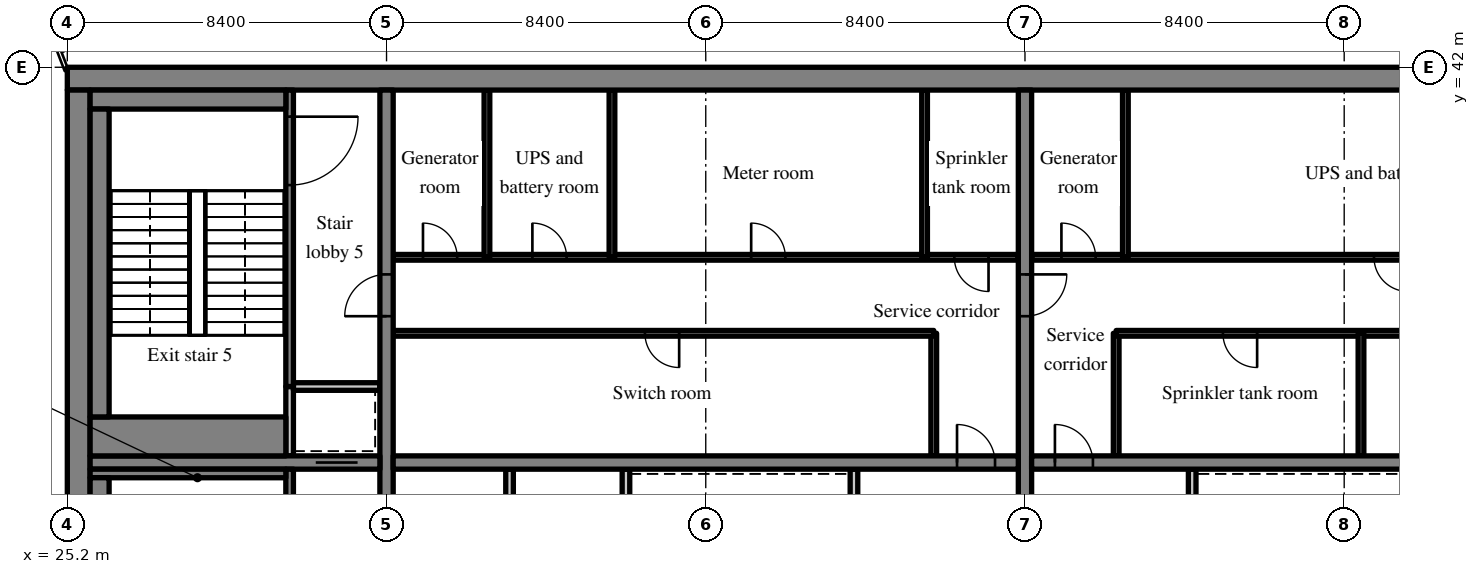
"""IFC4 building model, lengths in metres.
Left out: names, types, materials, properties, quantities, classifications, styles, units other than length and angle.
Written with IfcOpenShell. Run it as: python <this file> out.ifc"""

import sys

from ifc_helpers import new_model, si_unit, direction, frame, frame_2d, origin, place, context, subcontext, project, spatial, rectangle, extrude, source, transform, mapped, element, fill, save


model = new_model("IFC4")
c1 = context("Model", 3, precision=1e-05, world=origin(), true_north=direction((0.0, 1.0)))
c2 = subcontext(c1, "Body", "Model", "MODEL_VIEW")
j1 = project(units=[si_unit("LENGTHUNIT", "METRE"), si_unit("PLANEANGLEUNIT", "RADIAN")], contexts=[c1])
p1 = place(None, origin())
s1 = spatial("IfcSite", under=j1, at=p1, CompositionType="ELEMENT")
p2 = place(p1, origin())
s2 = spatial("IfcBuilding", under=s1, at=p2, CompositionType="ELEMENT")
p3 = place(p2, frame((0.0, 0.0, 206.4)))
s3 = spatial("IfcBuildingStorey", under=s2, at=p3, CompositionType="ELEMENT", Elevation=206.4)
m1 = source(origin(), c2, "Body", "SweptSolid", [
    extrude(rectangle(XDim=50.4, YDim=0.6, at=frame_2d((25.2, 0.0))), origin(), (0.0, 0.0, 1.0), 7.32),
])
p4 = place(p3, frame((25.2, 41.7, 0.0), z_axis=(0.0, 0.0, 1.0), x_axis=(1.0, 0.0, 0.0)))
e1 = element("IfcWall", 1, at=p4, inside=s3, PredefinedType="SHEAR", context=c2, shape_type="MappedRepresentation", body=[
    mapped(m1, transform((0.0, 0.0, 0.0), scale=1.0)),
])
m2 = source(origin(), c2, "Body", "SweptSolid", [
    extrude(rectangle(XDim=18.8, YDim=0.6, at=frame_2d((9.4, 0.0))), origin(), (0.0, 0.0, 1.0), 7.32),
])
p5 = place(p3, frame((25.5, 22.6, 0.0), z_axis=(0.0, 0.0, 1.0), x_axis=(0.0, 1.0, 0.0)))
e2 = element("IfcWall", 2, at=p5, inside=s3, PredefinedType="SHEAR", context=c2, shape_type="MappedRepresentation", body=[
    mapped(m2, transform((0.0, 0.0, 0.0), scale=1.0)),
])
m3 = source(origin(), c2, "Body", "SweptSolid", [
    extrude(rectangle(XDim=18.8, YDim=0.35, at=frame_2d((9.4, 0.0))), origin(), (0.0, 0.0, 1.0), 7.32),
])
p6 = place(p3, frame((33.6, 22.6, 0.0), z_axis=(0.0, 0.0, 1.0), x_axis=(0.0, 1.0, 0.0)))
e3 = element("IfcWall", 3, at=p6, inside=s3, PredefinedType="SHEAR", context=c2, shape_type="MappedRepresentation", body=[
    mapped(m3, transform((0.0, 0.0, 0.0), scale=1.0)),
])
m4 = source(origin(), c2, "Body", "SweptSolid", [
    extrude(rectangle(XDim=1.1, YDim=2.1, at=frame_2d((0.55, 1.05))), frame((0.0, 0.185, 0.0), z_axis=(0.0, -1.0, 0.0), x_axis=(1.0, 0.0, 0.0)), (0.0, 0.0, 1.0), 0.37),
])
p7 = place(p6, frame((12.85, 0.0, 0.0)))
e4 = element("IfcOpeningElement", 4, at=p7, cuts=e3, PredefinedType="OPENING", context=c2, shape_type="MappedRepresentation", body=[
    mapped(m4, transform((0.0, 0.0, 0.0), scale=1.0)),
])
p8 = place(p3, frame((50.4, 22.6, 0.0), z_axis=(0.0, 0.0, 1.0), x_axis=(0.0, 1.0, 0.0)))
e5 = element("IfcWall", 5, at=p8, inside=s3, PredefinedType="SHEAR", context=c2, shape_type="MappedRepresentation", body=[
    mapped(m3, transform((0.0, 0.0, 0.0), scale=1.0)),
])
p9 = place(p8, frame((12.85, 0.0, 0.0)))
e6 = element("IfcOpeningElement", 6, at=p9, cuts=e5, PredefinedType="OPENING", context=c2, shape_type="MappedRepresentation", body=[
    mapped(m4, transform((0.0, 0.0, 0.0), scale=1.0)),
])
m5 = source(origin(), c2, "Body", "SweptSolid", [
    extrude(rectangle(XDim=7.625, YDim=0.35, at=frame_2d((3.812, 0.0))), origin(), (0.0, 0.0, 1.0), 7.32),
])
p10 = place(p3, frame((25.8, 31.6, 0.0), z_axis=(0.0, 0.0, 1.0), x_axis=(1.0, 0.0, 0.0)))
e7 = element("IfcWall", 7, at=p10, inside=s3, PredefinedType="SHEAR", context=c2, shape_type="MappedRepresentation", body=[
    mapped(m5, transform((0.0, 0.0, 0.0), scale=1.0)),
])
p11 = place(p10, frame((5.938, 0.0, 0.0)))
e8 = element("IfcOpeningElement", 8, at=p11, cuts=e7, PredefinedType="OPENING", context=c2, shape_type="MappedRepresentation", body=[
    mapped(m4, transform((0.0, 0.0, 0.0), scale=1.0)),
])
m6 = source(origin(), c2, "Body", "SweptSolid", [
    extrude(rectangle(XDim=16.45, YDim=0.35, at=frame_2d((8.225, 0.0))), origin(), (0.0, 0.0, 1.0), 7.32),
])
p12 = place(p3, frame((33.775, 31.6, 0.0), z_axis=(0.0, 0.0, 1.0), x_axis=(1.0, 0.0, 0.0)))
e9 = element("IfcWall", 9, at=p12, inside=s3, PredefinedType="SHEAR", context=c2, shape_type="MappedRepresentation", body=[
    mapped(m6, transform((0.0, 0.0, 0.0), scale=1.0)),
])
m7 = source(origin(), c2, "Body", "SweptSolid", [
    extrude(rectangle(XDim=1.0, YDim=2.1, at=frame_2d((0.5, 1.05))), frame((0.0, 0.185, 0.0), z_axis=(0.0, -1.0, 0.0), x_axis=(1.0, 0.0, 0.0)), (0.0, 0.0, 1.0), 0.37),
])
p13 = place(p12, frame((14.837, 0.0, 0.0)))
e10 = element("IfcOpeningElement", 10, at=p13, cuts=e9, PredefinedType="OPENING", context=c2, shape_type="MappedRepresentation", body=[
    mapped(m7, transform((0.0, 0.0, 0.0), scale=1.0)),
])
m8 = source(origin(), c2, "Body", "SweptSolid", [
    extrude(rectangle(XDim=16.45, YDim=0.35, at=frame_2d((8.225, 0.0))), origin(), (0.0, 0.0, 1.0), 7.32),
])
p14 = place(p3, frame((50.575, 31.6, 0.0), z_axis=(0.0, 0.0, 1.0), x_axis=(1.0, 0.0, 0.0)))
e11 = element("IfcWall", 11, at=p14, inside=s3, PredefinedType="SHEAR", context=c2, shape_type="MappedRepresentation", body=[
    mapped(m8, transform((0.0, 0.0, 0.0), scale=1.0)),
])
p15 = place(p14, frame((0.613, 0.0, 0.0)))
e12 = element("IfcOpeningElement", 12, at=p15, cuts=e11, PredefinedType="OPENING", context=c2, shape_type="MappedRepresentation", body=[
    mapped(m7, transform((0.0, 0.0, 0.0), scale=1.0)),
])
m9 = source(origin(), c2, "Body", "SweptSolid", [
    extrude(rectangle(XDim=8.825, YDim=0.2, at=frame_2d((4.413, 0.0))), origin(), (0.0, 0.0, 1.0), 7.32),
])
for number, where, z_axis, x_axis in (
    (13, (45.9, 22.6, 0.0), (0.0, 0.0, 1.0), (0.0, 1.0, 0.0)),
    (14, (39.9, 22.6, 0.0), (0.0, 0.0, 1.0), (0.0, 1.0, 0.0)),
    (15, (36.837, 22.6, 0.0), (0.0, 0.0, 1.0), (0.0, 1.0, 0.0)),
):
    element("IfcWall", number, at=place(p3, frame(where, z_axis=z_axis, x_axis=x_axis)), inside=s3, PredefinedType="PARTITIONING", context=c2, shape_type="MappedRepresentation", body=[
        mapped(m9, transform((0.0, 0.0, 0.0), scale=1.0)),
    ])
m10 = source(origin(), c2, "Body", "SweptSolid", [
    extrude(rectangle(XDim=3.225, YDim=0.15, at=frame_2d((1.613, 0.0))), origin(), (0.0, 0.0, 1.0), 7.32),
])
p16 = place(p3, frame((48.0, 31.775, 0.0), z_axis=(0.0, 0.0, 1.0), x_axis=(0.0, 1.0, 0.0)))
e16 = element("IfcWall", 16, at=p16, inside=s3, PredefinedType="PARTITIONING", context=c2, shape_type="MappedRepresentation", body=[
    mapped(m10, transform((0.0, 0.0, 0.0), scale=1.0)),
])
m11 = source(origin(), c2, "Body", "SweptSolid", [
    extrude(rectangle(XDim=14.225, YDim=0.15, at=frame_2d((7.113, 0.0))), origin(), (0.0, 0.0, 1.0), 7.32),
])
p17 = place(p3, frame((33.775, 35.0, 0.0), z_axis=(0.0, 0.0, 1.0), x_axis=(1.0, 0.0, 0.0)))
e17 = element("IfcWall", 17, at=p17, inside=s3, PredefinedType="PARTITIONING", context=c2, shape_type="MappedRepresentation", body=[
    mapped(m11, transform((0.0, 0.0, 0.0), scale=1.0)),
])
m12 = source(origin(), c2, "Body", "SweptSolid", [
    extrude(rectangle(XDim=0.9, YDim=2.1, at=frame_2d((0.45, 1.05))), frame((0.0, 0.085, 0.0), z_axis=(0.0, -1.0, 0.0), x_axis=(1.0, 0.0, 0.0)), (0.0, 0.0, 1.0), 0.17),
])
p18 = place(p17, frame((6.625, 0.0, 0.0)))
e18 = element("IfcOpeningElement", 18, at=p18, cuts=e17, PredefinedType="OPENING", context=c2, shape_type="MappedRepresentation", body=[
    mapped(m12, transform((0.0, 0.0, 0.0), scale=1.0)),
])
m13 = source(origin(), c2, "Body", "SweptSolid", [
    extrude(rectangle(XDim=16.45, YDim=0.15, at=frame_2d((8.225, 0.0))), origin(), (0.0, 0.0, 1.0), 7.32),
])
p19 = place(p3, frame((33.775, 37.0, 0.0), z_axis=(0.0, 0.0, 1.0), x_axis=(1.0, 0.0, 0.0)))
e19 = element("IfcWall", 19, at=p19, inside=s3, PredefinedType="PARTITIONING", context=c2, shape_type="MappedRepresentation", body=[
    mapped(m13, transform((0.0, 0.0, 0.0), scale=1.0)),
])
p20 = place(p19, frame((0.784, 0.0, 0.0)))
e20 = element("IfcOpeningElement", 20, at=p20, cuts=e19, PredefinedType="OPENING", context=c2, shape_type="MappedRepresentation", body=[
    mapped(m12, transform((0.0, 0.0, 0.0), scale=1.0)),
])
p21 = place(p19, frame((3.663, 0.0, 0.0)))
e21 = element("IfcOpeningElement", 21, at=p21, cuts=e19, PredefinedType="OPENING", context=c2, shape_type="MappedRepresentation", body=[
    mapped(m12, transform((0.0, 0.0, 0.0), scale=1.0)),
])
p22 = place(p19, frame((9.42, 0.0, 0.0)))
e22 = element("IfcOpeningElement", 22, at=p22, cuts=e19, PredefinedType="OPENING", context=c2, shape_type="MappedRepresentation", body=[
    mapped(m12, transform((0.0, 0.0, 0.0), scale=1.0)),
])
p23 = place(p19, frame((14.766, 0.0, 0.0)))
e23 = element("IfcOpeningElement", 23, at=p23, cuts=e19, PredefinedType="OPENING", context=c2, shape_type="MappedRepresentation", body=[
    mapped(m12, transform((0.0, 0.0, 0.0), scale=1.0)),
])
m14 = source(origin(), c2, "Body", "SweptSolid", [
    extrude(rectangle(XDim=4.4, YDim=0.15, at=frame_2d((2.2, 0.0))), origin(), (0.0, 0.0, 1.0), 7.32),
])
for number, where, z_axis, x_axis in (
    (24, (36.242, 37.0, 0.0), (0.0, 0.0, 1.0), (0.0, 1.0, 0.0)),
    (25, (39.532, 37.0, 0.0), (0.0, 0.0, 1.0), (0.0, 1.0, 0.0)),
    (26, (47.758, 37.0, 0.0), (0.0, 0.0, 1.0), (0.0, 1.0, 0.0)),
):
    element("IfcWall", number, at=place(p3, frame(where, z_axis=z_axis, x_axis=x_axis)), inside=s3, PredefinedType="PARTITIONING", context=c2, shape_type="MappedRepresentation", body=[
        mapped(m14, transform((0.0, 0.0, 0.0), scale=1.0)),
    ])
m15 = source(origin(), c2, "Body", "SweptSolid", [
    extrude(rectangle(XDim=2.625, YDim=0.2, at=frame_2d((1.312, 0.0))), origin(), (0.0, 0.0, 1.0), 7.32),
])
p24 = place(p3, frame((54.8, 28.8, 0.0), z_axis=(0.0, 0.0, 1.0), x_axis=(0.0, 1.0, 0.0)))
e27 = element("IfcWall", 27, at=p24, inside=s3, PredefinedType="SOLIDWALL", context=c2, shape_type="MappedRepresentation", body=[
    mapped(m15, transform((0.0, 0.0, 0.0), scale=1.0)),
])
p25 = place(p3, frame((52.8, 31.775, 0.0), z_axis=(0.0, 0.0, 1.0), x_axis=(0.0, 1.0, 0.0)))
e28 = element("IfcWall", 28, at=p25, inside=s3, PredefinedType="PARTITIONING", context=c2, shape_type="MappedRepresentation", body=[
    mapped(m10, transform((0.0, 0.0, 0.0), scale=1.0)),
])
m16 = source(origin(), c2, "Body", "SweptSolid", [
    extrude(rectangle(XDim=14.225, YDim=0.15, at=frame_2d((7.112, 0.0))), origin(), (0.0, 0.0, 1.0), 7.32),
])
p26 = place(p3, frame((67.025, 35.0, 0.0), z_axis=(0.0, 0.0, 1.0), x_axis=(-1.0, 0.0, 0.0)))
e29 = element("IfcWall", 29, at=p26, inside=s3, PredefinedType="PARTITIONING", context=c2, shape_type="MappedRepresentation", body=[
    mapped(m16, transform((0.0, 0.0, 0.0), scale=1.0)),
])
p27 = place(p26, frame((3.441, 0.0, 0.0)))
e30 = element("IfcOpeningElement", 30, at=p27, cuts=e29, PredefinedType="OPENING", context=c2, shape_type="MappedRepresentation", body=[
    mapped(m12, transform((0.0, 0.0, 0.0), scale=1.0)),
])
p28 = place(p26, frame((10.516, 0.0, 0.0)))
e31 = element("IfcOpeningElement", 31, at=p28, cuts=e29, PredefinedType="OPENING", context=c2, shape_type="MappedRepresentation", body=[
    mapped(m12, transform((0.0, 0.0, 0.0), scale=1.0)),
])
m17 = source(origin(), c2, "Body", "SweptSolid", [
    extrude(rectangle(XDim=16.45, YDim=0.15, at=frame_2d((8.225, 0.0))), origin(), (0.0, 0.0, 1.0), 7.32),
])
p29 = place(p3, frame((67.025, 37.0, 0.0), z_axis=(0.0, 0.0, 1.0), x_axis=(-1.0, 0.0, 0.0)))
e32 = element("IfcWall", 32, at=p29, inside=s3, PredefinedType="PARTITIONING", context=c2, shape_type="MappedRepresentation", body=[
    mapped(m17, transform((0.0, 0.0, 0.0), scale=1.0)),
])
p30 = place(p29, frame((6.541, 0.0, 0.0)))
e33 = element("IfcOpeningElement", 33, at=p30, cuts=e32, PredefinedType="OPENING", context=c2, shape_type="MappedRepresentation", body=[
    mapped(m12, transform((0.0, 0.0, 0.0), scale=1.0)),
])
p31 = place(p29, frame((14.766, 0.0, 0.0)))
e34 = element("IfcOpeningElement", 34, at=p31, cuts=e32, PredefinedType="OPENING", context=c2, shape_type="MappedRepresentation", body=[
    mapped(m12, transform((0.0, 0.0, 0.0), scale=1.0)),
])
p32 = place(p3, frame((59.242, 31.775, 0.0), z_axis=(0.0, 0.0, 1.0), x_axis=(0.0, 1.0, 0.0)))
e35 = element("IfcWall", 35, at=p32, inside=s3, PredefinedType="PARTITIONING", context=c2, shape_type="MappedRepresentation", body=[
    mapped(m10, transform((0.0, 0.0, 0.0), scale=1.0)),
])
p33 = place(p3, frame((53.042, 37.0, 0.0), z_axis=(0.0, 0.0, 1.0), x_axis=(0.0, 1.0, 0.0)))
e36 = element("IfcWall", 36, at=p33, inside=s3, PredefinedType="PARTITIONING", context=c2, shape_type="MappedRepresentation", body=[
    mapped(m14, transform((0.0, 0.0, 0.0), scale=1.0)),
])
m18 = source(origin(), c2, "Body", "SweptSolid", [
    extrude(rectangle(XDim=8.825, YDim=0.2, at=frame_2d((4.413, 0.0))), origin(), (0.0, 0.0, 1.0), 7.32),
])
p34 = place(p3, frame((31.05, 22.6, 0.0), z_axis=(0.0, 0.0, 1.0), x_axis=(0.0, 1.0, 0.0)))
e37 = element("IfcWall", 37, at=p34, inside=s3, PredefinedType="SOLIDWALL", context=c2, shape_type="MappedRepresentation", body=[
    mapped(m18, transform((0.0, 0.0, 0.0), scale=1.0)),
])
m19 = source(origin(), c2, "Body", "SweptSolid", [
    extrude(rectangle(XDim=1.2, YDim=2.1, at=frame_2d((0.6, 1.05))), frame((0.0, 0.11, 0.0), z_axis=(0.0, -1.0, 0.0), x_axis=(1.0, 0.0, 0.0)), (0.0, 0.0, 1.0), 0.22),
])
p35 = place(p34, frame((6.9, 0.0, 0.0)))
e38 = element("IfcOpeningElement", 38, at=p35, cuts=e37, PredefinedType="OPENING", context=c2, shape_type="MappedRepresentation", body=[
    mapped(m19, transform((0.0, 0.0, 0.0), scale=1.0)),
])
m20 = source(origin(), c2, "Body", "SweptSolid", [
    extrude(rectangle(XDim=1.825, YDim=0.2, at=frame_2d((0.913, 0.0))), origin(), (0.0, 0.0, 1.0), 7.32),
])
p36 = place(p3, frame((31.05, 31.775, 0.0), z_axis=(0.0, 0.0, 1.0), x_axis=(0.0, 1.0, 0.0)))
e39 = element("IfcWall", 39, at=p36, inside=s3, PredefinedType="SOLIDWALL", context=c2, shape_type="MappedRepresentation", body=[
    mapped(m20, transform((0.0, 0.0, 0.0), scale=1.0)),
])
m21 = source(origin(), c2, "Body", "SweptSolid", [
    extrude(rectangle(XDim=2.275, YDim=0.2, at=frame_2d((1.138, 0.0))), origin(), (0.0, 0.0, 1.0), 7.32),
])
p37 = place(p3, frame((31.15, 33.6, 0.0), z_axis=(0.0, 0.0, 1.0), x_axis=(1.0, 0.0, 0.0)))
e40 = element("IfcWall", 40, at=p37, inside=s3, PredefinedType="SOLIDWALL", context=c2, shape_type="MappedRepresentation", body=[
    mapped(m21, transform((0.0, 0.0, 0.0), scale=1.0)),
])
m22 = source(origin(), c2, "Body", "SweptSolid", [
    extrude(rectangle(XDim=7.8, YDim=0.2, at=frame_2d((3.9, 0.0))), origin(), (0.0, 0.0, 1.0), 7.32),
])
p38 = place(p3, frame((31.05, 33.6, 0.0), z_axis=(0.0, 0.0, 1.0), x_axis=(0.0, 1.0, 0.0)))
e41 = element("IfcWall", 41, at=p38, inside=s3, PredefinedType="SOLIDWALL", context=c2, shape_type="MappedRepresentation", body=[
    mapped(m22, transform((0.0, 0.0, 0.0), scale=1.0)),
])
m23 = source(origin(), c2, "Body", "SweptSolid", [
    extrude(rectangle(XDim=1.8, YDim=2.1, at=frame_2d((0.9, 1.05))), frame((0.0, 0.11, 0.0), z_axis=(0.0, -1.0, 0.0), x_axis=(1.0, 0.0, 0.0)), (0.0, 0.0, 1.0), 0.22),
])
p39 = place(p38, frame((5.3, 0.0, 0.0)))
e42 = element("IfcOpeningElement", 42, at=p39, cuts=e41, PredefinedType="OPENING", context=c2, shape_type="MappedRepresentation", body=[
    mapped(m23, transform((0.0, 0.0, 0.0), scale=1.0)),
])
m24 = source(origin(), c2, "Body", "SweptSolid", [
    extrude(rectangle(XDim=5.15, YDim=0.225, at=frame_2d((2.575, 0.0))), origin(), (0.0, 0.0, 1.0), 7.32),
])
p40 = place(p3, frame((25.8, 31.312, 0.0), z_axis=(0.0, 0.0, 1.0), x_axis=(1.0, 0.0, 0.0)))
e43 = element("IfcWall", 43, at=p40, inside=s3, PredefinedType="SOLIDWALL", context=c2, shape_type="MappedRepresentation", body=[
    mapped(m24, transform((0.0, 0.0, 0.0), scale=1.0)),
])
m25 = source(origin(), c2, "Body", "SweptSolid", [
    extrude(rectangle(XDim=8.1, YDim=0.5, at=frame_2d((4.05, 0.0))), origin(), (0.0, 0.0, 1.0), 7.32),
])
p41 = place(p3, frame((26.05, 23.1, 0.0), z_axis=(0.0, 0.0, 1.0), x_axis=(0.0, 1.0, 0.0)))
e44 = element("IfcWall", 44, at=p41, inside=s3, PredefinedType="SOLIDWALL", context=c2, shape_type="MappedRepresentation", body=[
    mapped(m25, transform((0.0, 0.0, 0.0), scale=1.0)),
])
m26 = source(origin(), c2, "Body", "SweptSolid", [
    extrude(rectangle(XDim=5.15, YDim=0.5, at=frame_2d((2.575, 0.0))), origin(), (0.0, 0.0, 1.0), 7.32),
])
p42 = place(p3, frame((25.8, 41.15, 0.0), z_axis=(0.0, 0.0, 1.0), x_axis=(1.0, 0.0, 0.0)))
e45 = element("IfcWall", 45, at=p42, inside=s3, PredefinedType="SOLIDWALL", context=c2, shape_type="MappedRepresentation", body=[
    mapped(m26, transform((0.0, 0.0, 0.0), scale=1.0)),
])
m27 = source(origin(), c2, "Body", "SweptSolid", [
    extrude(rectangle(XDim=5.15, YDim=1.025, at=frame_2d((2.575, 0.0))), origin(), (0.0, 0.0, 1.0), 7.32),
])
p43 = place(p3, frame((25.8, 32.287, 0.0), z_axis=(0.0, 0.0, 1.0), x_axis=(1.0, 0.0, 0.0)))
e46 = element("IfcWall", 46, at=p43, inside=s3, PredefinedType="SOLIDWALL", context=c2, shape_type="MappedRepresentation", body=[
    mapped(m27, transform((0.0, 0.0, 0.0), scale=1.0)),
])
p44 = place(p3, frame((26.05, 32.8, 0.0), z_axis=(0.0, 0.0, 1.0), x_axis=(0.0, 1.0, 0.0)))
e47 = element("IfcWall", 47, at=p44, inside=s3, PredefinedType="SOLIDWALL", context=c2, shape_type="MappedRepresentation", body=[
    mapped(m25, transform((0.0, 0.0, 0.0), scale=1.0)),
])
m28 = source(origin(), c2, "Body", "SweptSolid", [
    extrude(rectangle(XDim=1.0, YDim=2.1, at=frame_2d((0.5, 1.05))), frame((0.0, 0.025, 0.0), z_axis=(0.0, -1.0, 0.0), x_axis=(1.0, 0.0, 0.0)), (0.0, 0.0, 1.0), 0.05),
])
p45 = place(p13, origin())
e48 = element("IfcDoor", 48, at=p45, inside=s3, OperationType="SINGLE_SWING_LEFT", PredefinedType="DOOR", context=c2, shape_type="MappedRepresentation", body=[
    mapped(m28, transform((0.0, 0.0, 0.0), scale=1.0)),
])
fill(e10, e48)
m29 = source(origin(), c2, "Body", "SweptSolid", [
    extrude(rectangle(XDim=0.9, YDim=2.1, at=frame_2d((0.45, 1.05))), frame((0.0, 0.025, 0.0), z_axis=(0.0, -1.0, 0.0), x_axis=(1.0, 0.0, 0.0)), (0.0, 0.0, 1.0), 0.05),
])
p46 = place(p18, origin())
e49 = element("IfcDoor", 49, at=p46, inside=s3, OperationType="SINGLE_SWING_RIGHT", PredefinedType="DOOR", context=c2, shape_type="MappedRepresentation", body=[
    mapped(m29, transform((0.0, 0.0, 0.0), scale=1.0)),
])
fill(e18, e49)
p47 = place(p20, origin())
e50 = element("IfcDoor", 50, at=p47, inside=s3, OperationType="SINGLE_SWING_LEFT", PredefinedType="DOOR", context=c2, shape_type="MappedRepresentation", body=[
    mapped(m29, transform((0.0, 0.0, 0.0), scale=1.0)),
])
fill(e20, e50)
p48 = place(p21, origin())
e51 = element("IfcDoor", 51, at=p48, inside=s3, OperationType="SINGLE_SWING_LEFT", PredefinedType="DOOR", context=c2, shape_type="MappedRepresentation", body=[
    mapped(m29, transform((0.0, 0.0, 0.0), scale=1.0)),
])
fill(e21, e51)
p49 = place(p22, origin())
e52 = element("IfcDoor", 52, at=p49, inside=s3, OperationType="SINGLE_SWING_LEFT", PredefinedType="DOOR", context=c2, shape_type="MappedRepresentation", body=[
    mapped(m29, transform((0.0, 0.0, 0.0), scale=1.0)),
])
fill(e22, e52)
p50 = place(p23, origin())
e53 = element("IfcDoor", 53, at=p50, inside=s3, OperationType="SINGLE_SWING_RIGHT", PredefinedType="DOOR", context=c2, shape_type="MappedRepresentation", body=[
    mapped(m29, transform((0.0, 0.0, 0.0), scale=1.0)),
])
fill(e23, e53)
p51 = place(p15, origin())
e54 = element("IfcDoor", 54, at=p51, inside=s3, OperationType="SINGLE_SWING_LEFT", PredefinedType="DOOR", context=c2, shape_type="MappedRepresentation", body=[
    mapped(m28, transform((0.0, 0.0, 0.0), scale=1.0)),
])
fill(e12, e54)
p52 = place(p28, origin())
e55 = element("IfcDoor", 55, at=p52, inside=s3, OperationType="SINGLE_SWING_LEFT", PredefinedType="DOOR", context=c2, shape_type="MappedRepresentation", body=[
    mapped(m29, transform((0.0, 0.0, 0.0), scale=1.0)),
])
fill(e31, e55)
p53 = place(p30, origin())
e56 = element("IfcDoor", 56, at=p53, inside=s3, OperationType="SINGLE_SWING_LEFT", PredefinedType="DOOR", context=c2, shape_type="MappedRepresentation", body=[
    mapped(m29, transform((0.0, 0.0, 0.0), scale=1.0)),
])
fill(e33, e56)
p54 = place(p31, origin())
e57 = element("IfcDoor", 57, at=p54, inside=s3, OperationType="SINGLE_SWING_RIGHT", PredefinedType="DOOR", context=c2, shape_type="MappedRepresentation", body=[
    mapped(m29, transform((0.0, 0.0, 0.0), scale=1.0)),
])
fill(e34, e57)
m30 = source(origin(), c2, "Body", "SweptSolid", [
    extrude(rectangle(XDim=1.1, YDim=2.1, at=frame_2d((0.55, 1.05))), frame((0.0, 0.025, 0.0), z_axis=(0.0, -1.0, 0.0), x_axis=(1.0, 0.0, 0.0)), (0.0, 0.0, 1.0), 0.05),
])
p55 = place(p11, origin())
e58 = element("IfcDoor", 58, at=p55, inside=s3, OperationType="SLIDING_TO_LEFT", PredefinedType="DOOR", context=c2, shape_type="MappedRepresentation", body=[
    mapped(m30, transform((0.0, 0.0, 0.0), scale=1.0)),
])
fill(e8, e58)
m31 = source(origin(), c2, "Body", "SweptSolid", [
    extrude(rectangle(XDim=1.8, YDim=2.1, at=frame_2d((0.9, 1.05))), frame((0.0, 0.025, 0.0), z_axis=(0.0, -1.0, 0.0), x_axis=(1.0, 0.0, 0.0)), (0.0, 0.0, 1.0), 0.05),
])
p56 = place(p39, origin())
e59 = element("IfcDoor", 59, at=p56, inside=s3, OperationType="SINGLE_SWING_RIGHT", PredefinedType="DOOR", context=c2, shape_type="MappedRepresentation", body=[
    mapped(m31, transform((0.0, 0.0, 0.0), scale=1.0)),
])
fill(e42, e59)
p57 = place(p7, origin())
e60 = element("IfcDoor", 60, at=p57, inside=s3, OperationType="SINGLE_SWING_LEFT", PredefinedType="DOOR", context=c2, shape_type="MappedRepresentation", body=[
    mapped(m30, transform((0.0, 0.0, 0.0), scale=1.0)),
])
fill(e4, e60)
p58 = place(p9, origin())
e61 = element("IfcDoor", 61, at=p58, inside=s3, OperationType="SINGLE_SWING_RIGHT", PredefinedType="DOOR", context=c2, shape_type="MappedRepresentation", body=[
    mapped(m30, transform((0.0, 0.0, 0.0), scale=1.0)),
])
fill(e6, e61)
save(model, sys.argv[1])
